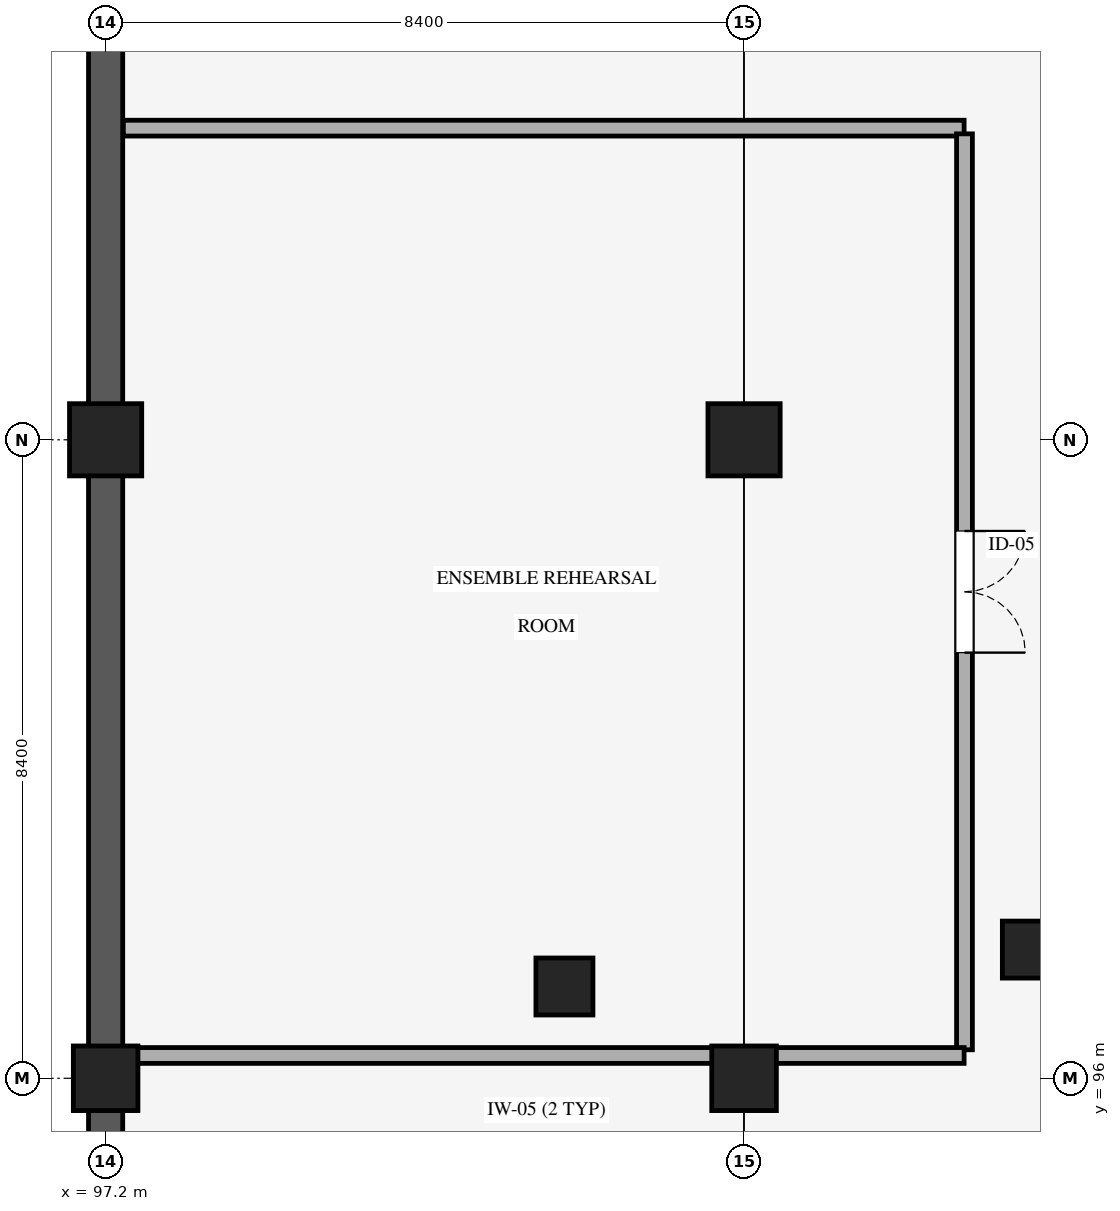
"""IFC4 building model, lengths in metres.
Left out: names, types, materials, properties, quantities, classifications, styles, units other than length and angle.
Written with IfcOpenShell. Run it as: python <this file> out.ifc"""

import sys

from ifc_helpers import new_model, si_unit, direction, frame, frame_2d, origin, origin_2d, place, context, subcontext, project, spatial, rectangle, circle, extrude, element, fill, save


model = new_model("IFC4")
c1 = context("Model", 3, precision=1e-05, world=origin(), true_north=direction((0.0, 1.0)))
c2 = subcontext(c1, "Body", "Model", "MODEL_VIEW")
j1 = project(units=[si_unit("LENGTHUNIT", "METRE"), si_unit("PLANEANGLEUNIT", "RADIAN")], contexts=[c1])
p1 = place(None, origin())
s1 = spatial("IfcSite", under=j1, at=p1, CompositionType="ELEMENT")
p2 = place(p1, origin())
s2 = spatial("IfcBuilding", under=s1, at=p2, CompositionType="ELEMENT")
p3 = place(p2, frame((0.0, 0.0, -4.8)))
s3 = spatial("IfcBuildingStorey", under=s2, at=p3, CompositionType="ELEMENT", Elevation=-4.8)
p4 = place(p3, frame((97.2, 96.0, 0.0), z_axis=(0.0, 0.0, 1.0), x_axis=(1.0, 0.0, 0.0)))
e1 = element("IfcColumn", 1, at=p4, inside=s3, PredefinedType="COLUMN", context=c2, shape_type="SweptSolid", body=[
    extrude(rectangle(XDim=0.85, YDim=0.85, at=origin_2d()), origin(), (0.0, 0.0, 1.0), 4.8),
])
p5 = place(p3, frame((97.2, 104.4, 0.0), z_axis=(0.0, 0.0, 1.0), x_axis=(1.0, 0.0, 0.0)))
e2 = element("IfcColumn", 2, at=p5, inside=s3, PredefinedType="COLUMN", context=c2, shape_type="SweptSolid", body=[
    extrude(rectangle(XDim=0.95, YDim=0.95, at=origin_2d()), origin(), (0.0, 0.0, 1.0), 4.8),
])
p6 = place(p3, frame((103.237, 97.208, 0.0), z_axis=(0.0, 0.0, 1.0), x_axis=(1.0, 0.0, 0.0)))
e3 = element("IfcColumn", 3, at=p6, inside=s3, PredefinedType="COLUMN", context=c2, shape_type="SweptSolid", body=[
    extrude(circle(Radius=0.375, at=origin_2d()), origin(), (0.0, 0.0, 1.0), 4.8),
])
p7 = place(p3, frame((105.6, 96.0, 0.0), z_axis=(0.0, 0.0, 1.0), x_axis=(1.0, 0.0, 0.0)))
e4 = element("IfcColumn", 4, at=p7, inside=s3, PredefinedType="COLUMN", context=c2, shape_type="SweptSolid", body=[
    extrude(rectangle(XDim=0.85, YDim=0.85, at=origin_2d()), origin(), (0.0, 0.0, 1.0), 4.8),
])
p8 = place(p3, frame((105.6, 104.4, 0.0), z_axis=(0.0, 0.0, 1.0), x_axis=(1.0, 0.0, 0.0)))
e5 = element("IfcColumn", 5, at=p8, inside=s3, PredefinedType="COLUMN", context=c2, shape_type="SweptSolid", body=[
    extrude(rectangle(XDim=0.95, YDim=0.95, at=origin_2d()), origin(), (0.0, 0.0, 1.0), 4.8),
])
p9 = place(p3, frame((109.373, 97.693, 0.0), z_axis=(0.0, 0.0, 1.0), x_axis=(1.0, 0.0, 0.0)))
e6 = element("IfcColumn", 6, at=p9, inside=s3, PredefinedType="COLUMN", context=c2, shape_type="SweptSolid", body=[
    extrude(circle(Radius=0.375, at=origin_2d()), origin(), (0.0, 0.0, 1.0), 4.8),
])
p10 = place(p3, frame((97.2, 62.64, 0.0), z_axis=(0.0, 0.0, 1.0), x_axis=(0.0, 1.0, 0.0)))
e7 = element("IfcWall", 7, at=p10, inside=s3, PredefinedType="USERDEFINED", context=c2, shape_type="SweptSolid", body=[
    extrude(rectangle(XDim=55.92, YDim=0.45, at=frame_2d((27.96, 0.0))), origin(), (0.0, 0.0, 1.0), 4.47),
])
p11 = place(p3, frame((97.433, 108.5, 0.0), z_axis=(0.0, 0.0, 1.0), x_axis=(1.0, 0.0, 0.0)))
e8 = element("IfcWall", 8, at=p11, inside=s3, PredefinedType="STANDARD", context=c2, shape_type="SweptSolid", body=[
    extrude(rectangle(XDim=11.062, YDim=0.208, at=frame_2d((5.531, 0.0))), origin(), (0.0, 0.0, 1.0), 4.45),
])
p12 = place(p3, frame((108.5, 108.425, 0.0), z_axis=(0.0, 0.0, 1.0), x_axis=(0.0, -1.0, 0.0)))
e9 = element("IfcWall", 9, at=p12, inside=s3, PredefinedType="STANDARD", context=c2, shape_type="SweptSolid", body=[
    extrude(rectangle(XDim=12.05, YDim=0.208, at=frame_2d((6.025, 0.0))), origin(), (0.0, 0.0, 1.0), 3.5),
])
p13 = place(p12, frame((5.225, 0.0, 0.0)))
e10 = element("IfcOpeningElement", 10, at=p13, cuts=e9, PredefinedType="OPENING", context=c2, shape_type="SweptSolid", body=[
    extrude(rectangle(XDim=1.6, YDim=2.25, at=frame_2d((0.8, 1.125))), frame((0.0, 0.114, 0.0), z_axis=(0.0, -1.0, 0.0), x_axis=(1.0, 0.0, 0.0)), (0.0, 0.0, 1.0), 0.228),
])
p14 = place(p3, frame((108.495, 96.3, 0.0), z_axis=(0.0, 0.0, 1.0), x_axis=(-1.0, 0.0, 0.0)))
e11 = element("IfcWall", 11, at=p14, inside=s3, PredefinedType="STANDARD", context=c2, shape_type="SweptSolid", body=[
    extrude(rectangle(XDim=10.99, YDim=0.208, at=frame_2d((5.495, 0.0))), origin(), (0.0, 0.0, 1.0), 3.5),
])
p15 = place(p13, origin())
e12 = element("IfcDoor", 12, at=p15, inside=s3, OperationType="DOUBLE_DOOR_SINGLE_SWING", PredefinedType="DOOR", context=c2, shape_type="SweptSolid", body=[
    extrude(rectangle(XDim=1.6, YDim=2.25, at=frame_2d((0.8, 1.125))), frame((0.0, 0.025, 0.0), z_axis=(0.0, -1.0, 0.0), x_axis=(1.0, 0.0, 0.0)), (0.0, 0.0, 1.0), 0.05),
])
fill(e10, e12)
save(model, sys.argv[1])
